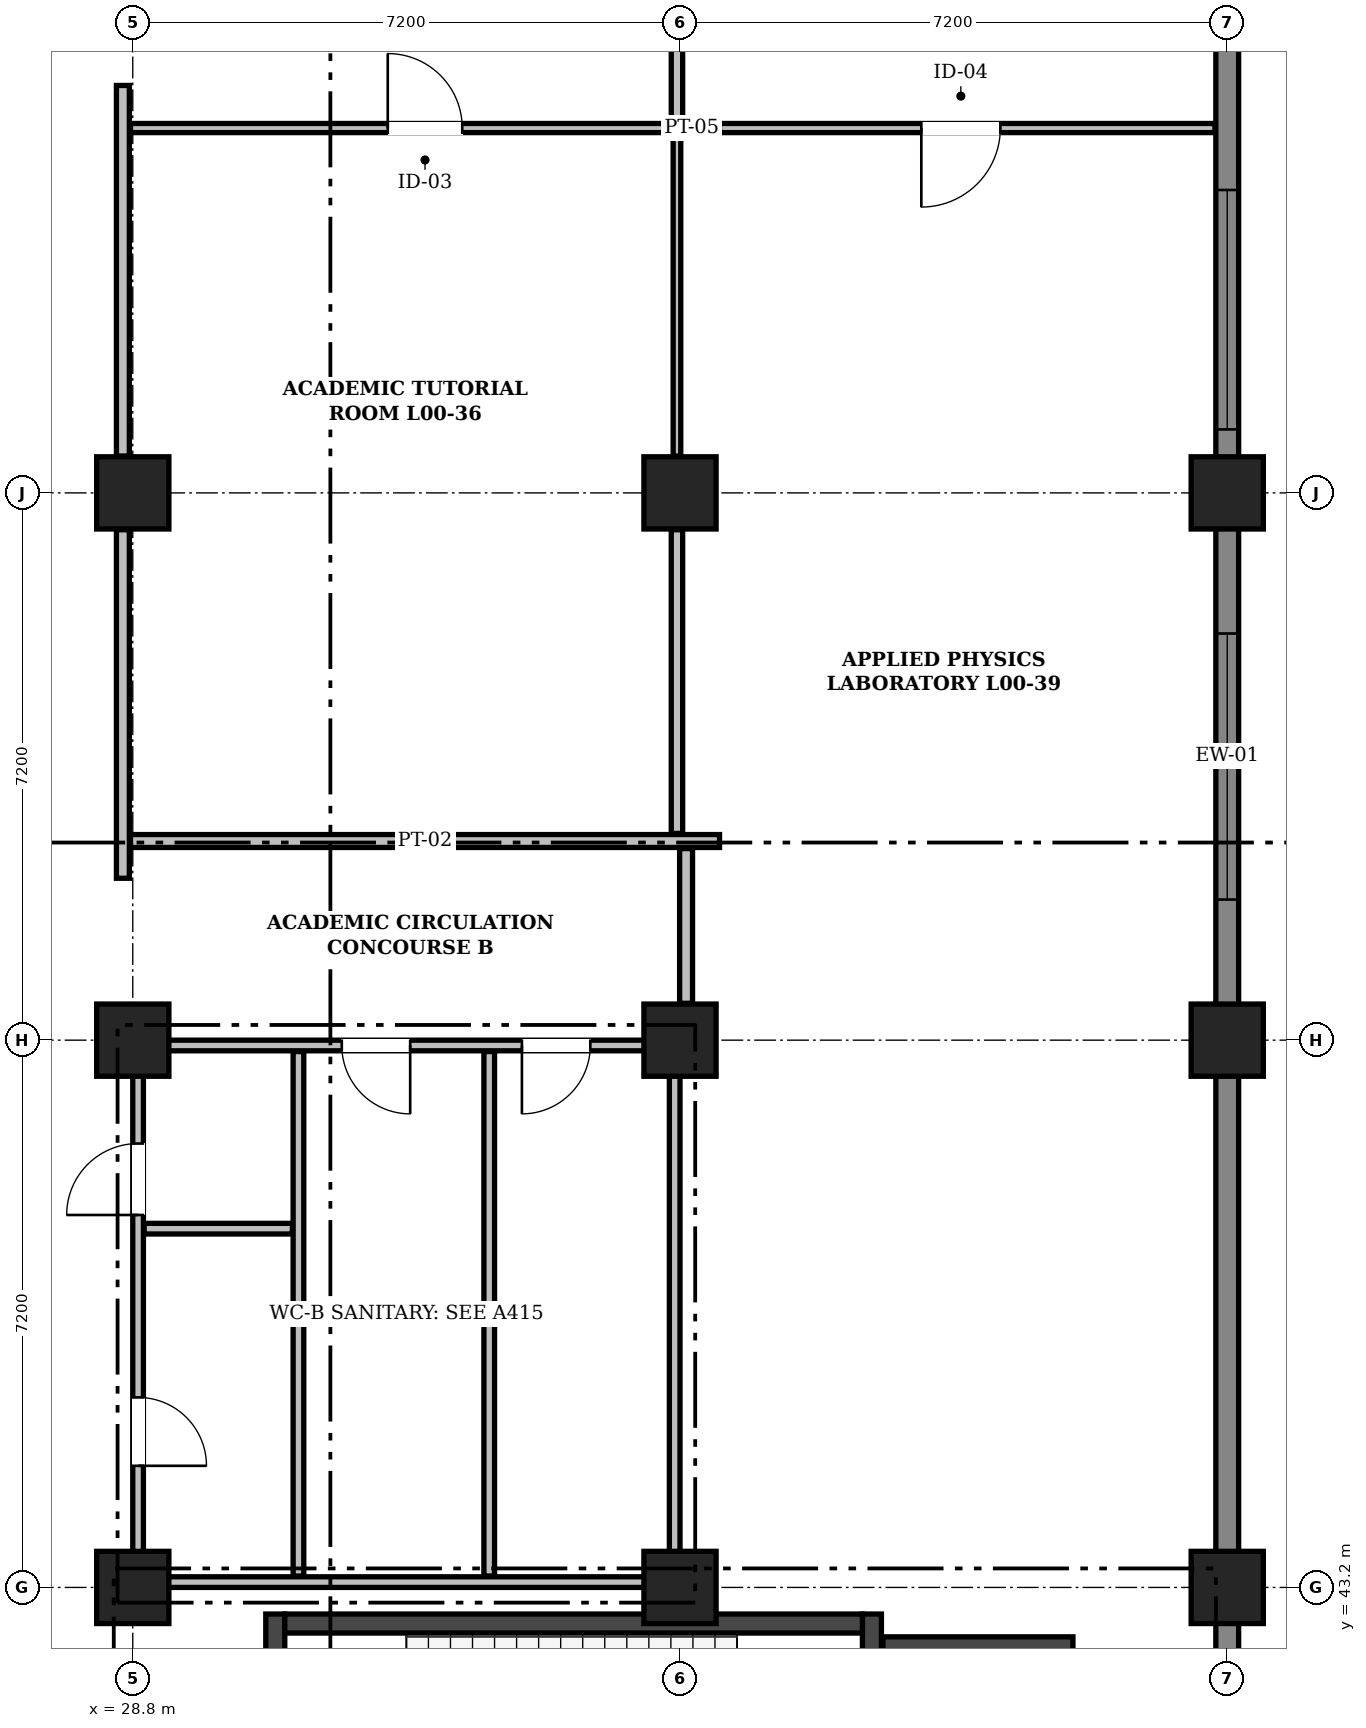
"""IFC4 building model, lengths in metres.
Left out: names, types, materials, properties, quantities, classifications, styles, units other than length and angle.
Written with IfcOpenShell. Run it as: python <this file> out.ifc"""

import sys

from ifc_helpers import new_model, si_unit, direction, frame, frame_2d, origin, origin_2d, place, context, subcontext, project, spatial, rectangle, extrude, element, fill, save


model = new_model("IFC4")
c1 = context("Model", 3, precision=1e-05, world=origin(), true_north=direction((0.0, 1.0)))
c2 = subcontext(c1, "Body", "Model", "MODEL_VIEW")
j1 = project(units=[si_unit("LENGTHUNIT", "METRE"), si_unit("PLANEANGLEUNIT", "RADIAN")], contexts=[c1])
p1 = place(None, origin())
s1 = spatial("IfcSite", under=j1, at=p1, CompositionType="ELEMENT")
p2 = place(p1, origin())
s2 = spatial("IfcBuilding", under=s1, at=p2, CompositionType="ELEMENT")
p3 = place(p2, origin())
s3 = spatial("IfcBuildingStorey", under=s2, at=p3, CompositionType="ELEMENT", Elevation=0.0)
for number, where, z_axis, x_axis in (
    (1, (28.8, 43.2, 0.0), (0.0, 0.0, 1.0), (1.0, 0.0, 0.0)),
    (2, (28.8, 50.4, 0.0), (0.0, 0.0, 1.0), (1.0, 0.0, 0.0)),
    (3, (28.8, 57.6, 0.0), (0.0, 0.0, 1.0), (1.0, 0.0, 0.0)),
    (4, (36.0, 43.2, 0.0), (0.0, 0.0, 1.0), (1.0, 0.0, 0.0)),
    (5, (36.0, 50.4, 0.0), (0.0, 0.0, 1.0), (1.0, 0.0, 0.0)),
    (6, (36.0, 57.6, 0.0), (0.0, 0.0, 1.0), (1.0, 0.0, 0.0)),
    (7, (43.2, 43.2, 0.0), (0.0, 0.0, 1.0), (1.0, 0.0, 0.0)),
    (8, (43.2, 50.4, 0.0), (0.0, 0.0, 1.0), (1.0, 0.0, 0.0)),
    (9, (43.2, 57.6, 0.0), (0.0, 0.0, 1.0), (1.0, 0.0, 0.0)),
):
    element("IfcColumn", number, at=place(p3, frame(where, z_axis=z_axis, x_axis=x_axis)), inside=s3, PredefinedType="COLUMN", context=c2, shape_type="SweptSolid", body=[
        extrude(rectangle(XDim=0.95, YDim=0.95, at=origin_2d()), origin(), (0.0, 0.0, 1.0), 4.8),
    ])
p4 = place(p3, frame((43.2, 64.648, 0.0), z_axis=(0.0, 0.0, 1.0), x_axis=(0.0, -1.0, 0.0)))
e10 = element("IfcWall", 10, at=p4, inside=s3, PredefinedType="SOLIDWALL", context=c2, shape_type="SweptSolid", body=[
    extrude(rectangle(XDim=7.048, YDim=0.3, at=frame_2d((3.524, 0.0))), origin(), (0.0, 0.0, 1.0), 4.52),
])
p5 = place(p4, frame((3.063, 0.0, 0.95)))
e11 = element("IfcOpeningElement", 11, at=p5, cuts=e10, PredefinedType="OPENING", context=c2, shape_type="SweptSolid", body=[
    extrude(rectangle(XDim=3.15, YDim=1.8, at=frame_2d((1.575, 0.9))), frame((0.0, 0.162, 0.0), z_axis=(0.0, -1.0, 0.0), x_axis=(1.0, 0.0, 0.0)), (0.0, 0.0, 1.0), 0.324),
])
p6 = place(p3, frame((43.2, 57.6, 0.0), z_axis=(0.0, 0.0, 1.0), x_axis=(0.0, -1.0, 0.0)))
e12 = element("IfcWall", 12, at=p6, inside=s3, PredefinedType="SOLIDWALL", context=c2, shape_type="SweptSolid", body=[
    extrude(rectangle(XDim=7.2, YDim=0.3, at=frame_2d((3.6, 0.0))), origin(), (0.0, 0.0, 1.0), 4.52),
])
p7 = place(p6, frame((1.85, 0.0, 0.95)))
e13 = element("IfcOpeningElement", 13, at=p7, cuts=e12, PredefinedType="OPENING", context=c2, shape_type="SweptSolid", body=[
    extrude(rectangle(XDim=3.5, YDim=1.8, at=frame_2d((1.75, 0.9))), frame((0.0, 0.162, 0.0), z_axis=(0.0, -1.0, 0.0), x_axis=(1.0, 0.0, 0.0)), (0.0, 0.0, 1.0), 0.324),
])
p8 = place(p3, frame((43.2, 50.4, 0.0), z_axis=(0.0, 0.0, 1.0), x_axis=(0.0, -1.0, 0.0)))
e14 = element("IfcWall", 14, at=p8, inside=s3, PredefinedType="SOLIDWALL", context=c2, shape_type="SweptSolid", body=[
    extrude(rectangle(XDim=7.2, YDim=0.3, at=frame_2d((3.6, 0.0))), origin(), (0.0, 0.0, 1.0), 4.52),
])
p9 = place(p3, frame((43.2, 43.2, 0.0), z_axis=(0.0, 0.0, 1.0), x_axis=(0.0, -1.0, 0.0)))
e15 = element("IfcWall", 15, at=p9, inside=s3, PredefinedType="SOLIDWALL", context=c2, shape_type="SweptSolid", body=[
    extrude(rectangle(XDim=7.2, YDim=0.3, at=frame_2d((3.6, 0.0))), origin(), (0.0, 0.0, 1.0), 4.52),
])
p10 = place(p9, frame((4.6, 0.0, 0.0)))
e16 = element("IfcOpeningElement", 16, at=p10, cuts=e15, PredefinedType="OPENING", context=c2, shape_type="SweptSolid", body=[
    extrude(rectangle(XDim=1.6, YDim=2.2, at=frame_2d((0.8, 1.1))), frame((0.0, 0.162, 0.0), z_axis=(0.0, -1.0, 0.0), x_axis=(1.0, 0.0, 0.0)), (0.0, 0.0, 1.0), 0.324),
])
p11 = place(p3, frame((38.67, 42.4, 0.0), z_axis=(0.0, 0.0, 1.0), x_axis=(1.0, 0.0, 0.0)))
e17 = element("IfcWall", 17, at=p11, inside=s3, PredefinedType="SHEAR", context=c2, shape_type="SweptSolid", body=[
    extrude(rectangle(XDim=2.5, YDim=0.3, at=frame_2d((1.25, 0.0))), origin(), (0.0, 0.0, 1.0), 4.55),
])
p12 = place(p3, frame((30.675, 39.15, 0.0), z_axis=(0.0, 0.0, 1.0), x_axis=(0.0, 1.0, 0.0)))
e18 = element("IfcWall", 18, at=p12, inside=s3, PredefinedType="SHEAR", context=c2, shape_type="SweptSolid", body=[
    extrude(rectangle(XDim=3.7, YDim=0.25, at=frame_2d((1.85, 0.0))), origin(), (0.0, 0.0, 1.0), 4.55),
])
p13 = place(p12, frame((1.25, 0.0, 0.0)))
e19 = element("IfcOpeningElement", 19, at=p13, cuts=e18, PredefinedType="OPENING", context=c2, shape_type="SweptSolid", body=[
    extrude(rectangle(XDim=1.2, YDim=2.15, at=frame_2d((0.6, 1.075))), frame((0.0, 0.137, 0.0), z_axis=(0.0, -1.0, 0.0), x_axis=(1.0, 0.0, 0.0)), (0.0, 0.0, 1.0), 0.274),
])
p14 = place(p3, frame((38.525, 39.15, 0.0), z_axis=(0.0, 0.0, 1.0), x_axis=(0.0, 1.0, 0.0)))
e20 = element("IfcWall", 20, at=p14, inside=s3, PredefinedType="SHEAR", context=c2, shape_type="SweptSolid", body=[
    extrude(rectangle(XDim=3.7, YDim=0.25, at=frame_2d((1.85, 0.0))), origin(), (0.0, 0.0, 1.0), 4.55),
])
p15 = place(p3, frame((30.8, 42.725, 0.0), z_axis=(0.0, 0.0, 1.0), x_axis=(1.0, 0.0, 0.0)))
e21 = element("IfcWall", 21, at=p15, inside=s3, PredefinedType="SHEAR", context=c2, shape_type="SweptSolid", body=[
    extrude(rectangle(XDim=7.6, YDim=0.25, at=frame_2d((3.8, 0.0))), origin(), (0.0, 0.0, 1.0), 4.55),
])
p16 = place(p3, frame((28.87, 43.27, 0.0), z_axis=(0.0, 0.0, 1.0), x_axis=(1.0, 0.0, 0.0)))
e22 = element("IfcWall", 22, at=p16, inside=s3, PredefinedType="PARTITIONING", context=c2, shape_type="SweptSolid", body=[
    extrude(rectangle(XDim=7.06, YDim=0.14, at=frame_2d((3.53, 0.0))), origin(), (0.0, 0.0, 1.0), 3.83),
])
p17 = place(p3, frame((28.87, 50.33, 0.0), z_axis=(0.0, 0.0, 1.0), x_axis=(1.0, 0.0, 0.0)))
e23 = element("IfcWall", 23, at=p17, inside=s3, PredefinedType="PARTITIONING", context=c2, shape_type="SweptSolid", body=[
    extrude(rectangle(XDim=7.06, YDim=0.14, at=frame_2d((3.53, 0.0))), origin(), (0.0, 0.0, 1.0), 3.83),
])
p18 = place(p17, frame((2.68, 0.0, 0.0)))
e24 = element("IfcOpeningElement", 24, at=p18, cuts=e23, PredefinedType="OPENING", context=c2, shape_type="SweptSolid", body=[
    extrude(rectangle(XDim=0.9, YDim=2.08, at=frame_2d((0.45, 1.04))), frame((0.0, 0.082, 0.0), z_axis=(0.0, -1.0, 0.0), x_axis=(1.0, 0.0, 0.0)), (0.0, 0.0, 1.0), 0.164),
])
p19 = place(p17, frame((5.05, 0.0, 0.0)))
e25 = element("IfcOpeningElement", 25, at=p19, cuts=e23, PredefinedType="OPENING", context=c2, shape_type="SweptSolid", body=[
    extrude(rectangle(XDim=0.9, YDim=2.08, at=frame_2d((0.45, 1.04))), frame((0.0, 0.082, 0.0), z_axis=(0.0, -1.0, 0.0), x_axis=(1.0, 0.0, 0.0)), (0.0, 0.0, 1.0), 0.164),
])
p20 = place(p3, frame((28.87, 43.35, 0.0), z_axis=(0.0, 0.0, 1.0), x_axis=(0.0, 1.0, 0.0)))
e26 = element("IfcWall", 26, at=p20, inside=s3, PredefinedType="PARTITIONING", context=c2, shape_type="SweptSolid", body=[
    extrude(rectangle(XDim=6.9, YDim=0.14, at=frame_2d((3.45, 0.0))), origin(), (0.0, 0.0, 1.0), 4.08),
])
p21 = place(p20, frame((1.45, 0.0, 0.0)))
e27 = element("IfcOpeningElement", 27, at=p21, cuts=e26, PredefinedType="OPENING", context=c2, shape_type="SweptSolid", body=[
    extrude(rectangle(XDim=0.9, YDim=2.08, at=frame_2d((0.45, 1.04))), frame((0.0, 0.082, 0.0), z_axis=(0.0, -1.0, 0.0), x_axis=(1.0, 0.0, 0.0)), (0.0, 0.0, 1.0), 0.164),
])
p22 = place(p20, frame((4.75, 0.0, 0.0)))
e28 = element("IfcOpeningElement", 28, at=p22, cuts=e26, PredefinedType="OPENING", context=c2, shape_type="SweptSolid", body=[
    extrude(rectangle(XDim=0.94, YDim=2.1, at=frame_2d((0.47, 1.05))), frame((0.0, 0.082, 0.0), z_axis=(0.0, -1.0, 0.0), x_axis=(1.0, 0.0, 0.0)), (0.0, 0.0, 1.0), 0.164),
])
p23 = place(p3, frame((35.93, 43.35, 0.0), z_axis=(0.0, 0.0, 1.0), x_axis=(0.0, 1.0, 0.0)))
e29 = element("IfcWall", 29, at=p23, inside=s3, PredefinedType="PARTITIONING", context=c2, shape_type="SweptSolid", body=[
    extrude(rectangle(XDim=6.9, YDim=0.14, at=frame_2d((3.45, 0.0))), origin(), (0.0, 0.0, 1.0), 4.08),
])
for number, where, z_axis, x_axis in (
    (30, (30.98, 43.35, 0.0), (0.0, 0.0, 1.0), (0.0, 1.0, 0.0)),
    (31, (33.49, 43.35, 0.0), (0.0, 0.0, 1.0), (0.0, 1.0, 0.0)),
):
    element("IfcWall", number, at=place(p3, frame(where, z_axis=z_axis, x_axis=x_axis)), inside=s3, PredefinedType="PARTITIONING", context=c2, shape_type="SweptSolid", body=[
        extrude(rectangle(XDim=6.9, YDim=0.14, at=frame_2d((3.45, 0.0))), origin(), (0.0, 0.0, 1.0), 4.46),
    ])
p24 = place(p3, frame((28.95, 47.92, 0.0), z_axis=(0.0, 0.0, 1.0), x_axis=(1.0, 0.0, 0.0)))
e32 = element("IfcWall", 32, at=p24, inside=s3, PredefinedType="PARTITIONING", context=c2, shape_type="SweptSolid", body=[
    extrude(rectangle(XDim=1.95, YDim=0.14, at=frame_2d((0.975, 0.0))), origin(), (0.0, 0.0, 1.0), 4.46),
])
p25 = place(p3, frame((28.67, 58.085, 0.0), z_axis=(0.0, 0.0, 1.0), x_axis=(0.0, 1.0, 0.0)))
e33 = element("IfcWall", 33, at=p25, inside=s3, PredefinedType="PARTITIONING", context=c2, shape_type="SweptSolid", body=[
    extrude(rectangle(XDim=4.875, YDim=0.17, at=frame_2d((2.438, 0.0))), origin(), (0.0, 0.0, 1.0), 4.08),
])
p26 = place(p3, frame((28.67, 52.53, 0.0), z_axis=(0.0, 0.0, 1.0), x_axis=(0.0, 1.0, 0.0)))
e34 = element("IfcWall", 34, at=p26, inside=s3, PredefinedType="PARTITIONING", context=c2, shape_type="SweptSolid", body=[
    extrude(rectangle(XDim=4.585, YDim=0.17, at=frame_2d((2.292, 0.0))), origin(), (0.0, 0.0, 1.0), 4.08),
])
p27 = place(p3, frame((28.77, 53.02, 0.0), z_axis=(0.0, 0.0, 1.0), x_axis=(1.0, 0.0, 0.0)))
e35 = element("IfcWall", 35, at=p27, inside=s3, PredefinedType="PARTITIONING", context=c2, shape_type="SweptSolid", body=[
    extrude(rectangle(XDim=7.75, YDim=0.17, at=frame_2d((3.875, 0.0))), origin(), (0.0, 0.0, 1.0), 4.46),
])
p28 = place(p3, frame((36.08, 50.885, 0.0), z_axis=(0.0, 0.0, 1.0), x_axis=(0.0, 1.0, 0.0)))
e36 = element("IfcWall", 36, at=p28, inside=s3, PredefinedType="PARTITIONING", context=c2, shape_type="SweptSolid", body=[
    extrude(rectangle(XDim=2.035, YDim=0.17, at=frame_2d((1.018, 0.0))), origin(), (0.0, 0.0, 1.0), 4.08),
])
p29 = place(p3, frame((28.77, 62.4, 0.0), z_axis=(0.0, 0.0, 1.0), x_axis=(1.0, 0.0, 0.0)))
e37 = element("IfcWall", 37, at=p29, inside=s3, PredefinedType="PARTITIONING", context=c2, shape_type="SweptSolid", body=[
    extrude(rectangle(XDim=7.75, YDim=0.12, at=frame_2d((3.875, 0.0))), origin(), (0.0, 0.0, 1.0), 4.46),
])
p30 = place(p29, frame((3.385, 0.0, 0.0)))
e38 = element("IfcOpeningElement", 38, at=p30, cuts=e37, PredefinedType="OPENING", context=c2, shape_type="SweptSolid", body=[
    extrude(rectangle(XDim=0.98, YDim=2.14, at=frame_2d((0.49, 1.07))), frame((0.0, 0.072, 0.0), z_axis=(0.0, -1.0, 0.0), x_axis=(1.0, 0.0, 0.0)), (0.0, 0.0, 1.0), 0.144),
])
p31 = place(p3, frame((35.96, 58.085, 0.0), z_axis=(0.0, 0.0, 1.0), x_axis=(0.0, 1.0, 0.0)))
e39 = element("IfcWall", 39, at=p31, inside=s3, PredefinedType="PARTITIONING", context=c2, shape_type="SweptSolid", body=[
    extrude(rectangle(XDim=4.24, YDim=0.1, at=frame_2d((2.12, 0.0))), origin(), (0.0, 0.0, 1.0), 4.08),
])
p32 = place(p3, frame((35.96, 53.12, 0.0), z_axis=(0.0, 0.0, 1.0), x_axis=(0.0, 1.0, 0.0)))
e40 = element("IfcWall", 40, at=p32, inside=s3, PredefinedType="PARTITIONING", context=c2, shape_type="SweptSolid", body=[
    extrude(rectangle(XDim=3.995, YDim=0.15, at=frame_2d((1.998, 0.0))), origin(), (0.0, 0.0, 1.0), 4.08),
])
p33 = place(p3, frame((35.96, 62.475, 0.0), z_axis=(0.0, 0.0, 1.0), x_axis=(0.0, 1.0, 0.0)))
e41 = element("IfcWall", 41, at=p33, inside=s3, PredefinedType="PARTITIONING", context=c2, shape_type="SweptSolid", body=[
    extrude(rectangle(XDim=1.84, YDim=0.15, at=frame_2d((0.92, 0.0))), origin(), (0.0, 0.0, 1.0), 4.08),
])
p34 = place(p3, frame((36.52, 62.4, 0.0), z_axis=(0.0, 0.0, 1.0), x_axis=(1.0, 0.0, 0.0)))
e42 = element("IfcWall", 42, at=p34, inside=s3, PredefinedType="PARTITIONING", context=c2, shape_type="SweptSolid", body=[
    extrude(rectangle(XDim=6.518, YDim=0.12, at=frame_2d((3.259, 0.0))), origin(), (0.0, 0.0, 1.0), 4.46),
])
p35 = place(p34, frame((2.655, 0.0, 0.0)))
e43 = element("IfcOpeningElement", 43, at=p35, cuts=e42, PredefinedType="OPENING", context=c2, shape_type="SweptSolid", body=[
    extrude(rectangle(XDim=1.04, YDim=2.18, at=frame_2d((0.52, 1.09))), frame((0.0, 0.072, 0.0), z_axis=(0.0, -1.0, 0.0), x_axis=(1.0, 0.0, 0.0)), (0.0, 0.0, 1.0), 0.144),
])
p36 = place(p5, origin())
e44 = element("IfcWindow", 44, at=p36, inside=s3, PartitioningType="SINGLE_PANEL", PredefinedType="WINDOW", context=c2, shape_type="SweptSolid", body=[
    extrude(rectangle(XDim=3.15, YDim=1.8, at=frame_2d((1.575, 0.9))), frame((0.0, 0.03, 0.0), z_axis=(0.0, -1.0, 0.0), x_axis=(1.0, 0.0, 0.0)), (0.0, 0.0, 1.0), 0.06),
])
fill(e11, e44)
p37 = place(p7, origin())
e45 = element("IfcWindow", 45, at=p37, inside=s3, PartitioningType="SINGLE_PANEL", PredefinedType="WINDOW", context=c2, shape_type="SweptSolid", body=[
    extrude(rectangle(XDim=3.5, YDim=1.8, at=frame_2d((1.75, 0.9))), frame((0.0, 0.03, 0.0), z_axis=(0.0, -1.0, 0.0), x_axis=(1.0, 0.0, 0.0)), (0.0, 0.0, 1.0), 0.06),
])
fill(e13, e45)
p38 = place(p21, frame((0.9, 0.0, 0.0), z_axis=(0.0, 0.0, 1.0), x_axis=(-1.0, 0.0, 0.0)))
e46 = element("IfcDoor", 46, at=p38, inside=s3, OperationType="SINGLE_SWING_RIGHT", PredefinedType="DOOR", context=c2, shape_type="SweptSolid", body=[
    extrude(rectangle(XDim=0.9, YDim=2.08, at=frame_2d((0.45, 1.04))), frame((0.0, 0.025, 0.0), z_axis=(0.0, -1.0, 0.0), x_axis=(1.0, 0.0, 0.0)), (0.0, 0.0, 1.0), 0.05),
])
fill(e27, e46)
p39 = place(p22, origin())
e47 = element("IfcDoor", 47, at=p39, inside=s3, OperationType="SINGLE_SWING_LEFT", PredefinedType="DOOR", context=c2, shape_type="SweptSolid", body=[
    extrude(rectangle(XDim=0.94, YDim=2.1, at=frame_2d((0.47, 1.05))), frame((0.0, 0.025, 0.0), z_axis=(0.0, -1.0, 0.0), x_axis=(1.0, 0.0, 0.0)), (0.0, 0.0, 1.0), 0.05),
])
fill(e28, e47)
p40 = place(p18, frame((0.9, 0.0, 0.0), z_axis=(0.0, 0.0, 1.0), x_axis=(-1.0, 0.0, 0.0)))
e48 = element("IfcDoor", 48, at=p40, inside=s3, OperationType="SINGLE_SWING_LEFT", PredefinedType="DOOR", context=c2, shape_type="SweptSolid", body=[
    extrude(rectangle(XDim=0.9, YDim=2.08, at=frame_2d((0.45, 1.04))), frame((0.0, 0.025, 0.0), z_axis=(0.0, -1.0, 0.0), x_axis=(1.0, 0.0, 0.0)), (0.0, 0.0, 1.0), 0.05),
])
fill(e24, e48)
p41 = place(p19, frame((0.9, 0.0, 0.0), z_axis=(0.0, 0.0, 1.0), x_axis=(-1.0, 0.0, 0.0)))
e49 = element("IfcDoor", 49, at=p41, inside=s3, OperationType="SINGLE_SWING_RIGHT", PredefinedType="DOOR", context=c2, shape_type="SweptSolid", body=[
    extrude(rectangle(XDim=0.9, YDim=2.08, at=frame_2d((0.45, 1.04))), frame((0.0, 0.025, 0.0), z_axis=(0.0, -1.0, 0.0), x_axis=(1.0, 0.0, 0.0)), (0.0, 0.0, 1.0), 0.05),
])
fill(e25, e49)
p42 = place(p30, origin())
e50 = element("IfcDoor", 50, at=p42, inside=s3, OperationType="SINGLE_SWING_LEFT", PredefinedType="DOOR", context=c2, shape_type="SweptSolid", body=[
    extrude(rectangle(XDim=0.98, YDim=2.14, at=frame_2d((0.49, 1.07))), frame((0.0, 0.025, 0.0), z_axis=(0.0, -1.0, 0.0), x_axis=(1.0, 0.0, 0.0)), (0.0, 0.0, 1.0), 0.05),
])
fill(e38, e50)
p43 = place(p35, frame((1.04, 0.0, 0.0), z_axis=(0.0, 0.0, 1.0), x_axis=(-1.0, 0.0, 0.0)))
e51 = element("IfcDoor", 51, at=p43, inside=s3, OperationType="SINGLE_SWING_RIGHT", PredefinedType="DOOR", context=c2, shape_type="SweptSolid", body=[
    extrude(rectangle(XDim=1.04, YDim=2.18, at=frame_2d((0.52, 1.09))), frame((0.0, 0.025, 0.0), z_axis=(0.0, -1.0, 0.0), x_axis=(1.0, 0.0, 0.0)), (0.0, 0.0, 1.0), 0.05),
])
fill(e43, e51)
save(model, sys.argv[1])
